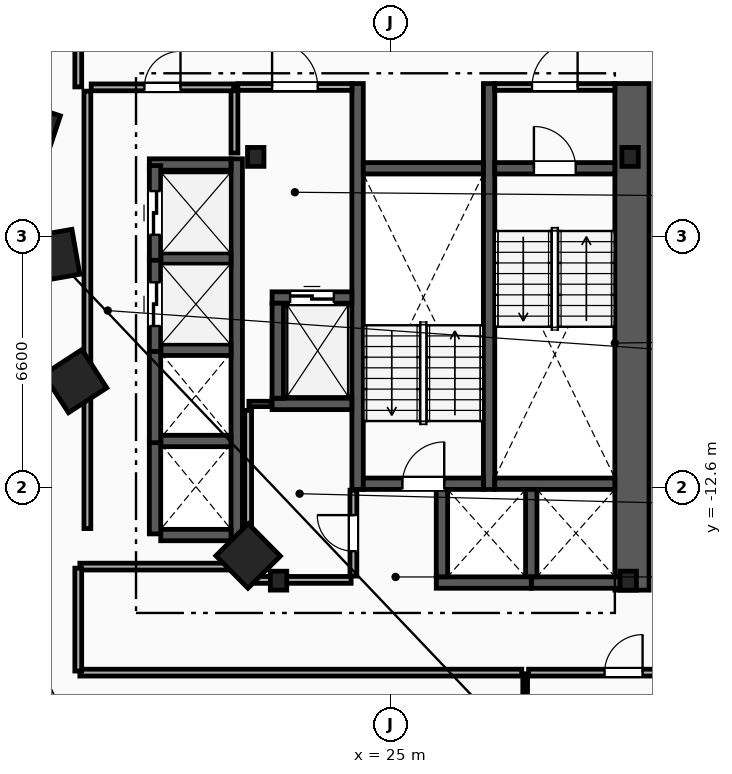
"""IFC4 building model, lengths in metres.
Left out: names, types, materials, properties, quantities, classifications, styles, units other than length and angle.
Written with IfcOpenShell. Run it as: python <this file> out.ifc"""

import sys

from ifc_helpers import new_model, si_unit, direction, frame, frame_2d, origin, origin_2d, place, context, subcontext, project, spatial, rectangle, i_section, extrude, element, fill, save


model = new_model("IFC4")
c1 = context("Model", 3, precision=1e-05, world=origin(), true_north=direction((0.0, 1.0)))
c2 = subcontext(c1, "Body", "Model", "MODEL_VIEW")
j1 = project(units=[si_unit("LENGTHUNIT", "METRE"), si_unit("PLANEANGLEUNIT", "RADIAN")], contexts=[c1])
p1 = place(None, origin())
s1 = spatial("IfcSite", under=j1, at=p1, CompositionType="ELEMENT")
p2 = place(p1, origin())
s2 = spatial("IfcBuilding", under=s1, at=p2, CompositionType="ELEMENT")
p3 = place(p2, frame((0.0, 0.0, 27.8)))
s3 = spatial("IfcBuildingStorey", under=s2, at=p3, CompositionType="ELEMENT", Elevation=27.8)
for number, where, z_axis, x_axis in (
    (1, (31.3, -3.9, 0.0), (0.0, 0.0, 1.0), (1.0, 0.0, 0.0)),
    (2, (21.45, -3.9, 0.0), (0.0, 0.0, 1.0), (1.0, 0.0, 0.0)),
    (3, (22.05, -15.05, 0.0), (0.0, 0.0, 1.0), (1.0, 0.0, 0.0)),
    (4, (31.25, -15.05, 0.0), (0.0, 0.0, 1.0), (1.0, 0.0, 0.0)),
):
    element("IfcColumn", number, at=place(p3, frame(where, z_axis=z_axis, x_axis=x_axis)), inside=s3, PredefinedType="COLUMN", context=c2, shape_type="SweptSolid", body=[
        extrude(i_section(OverallWidth=0.432, OverallDepth=0.498, WebThickness=0.056, FlangeThickness=0.089, FilletRadius=0.018, at=origin_2d()), origin(), (0.0, 0.0, 1.0), 3.8),
    ])
for number, where, z_axis, x_axis in (
    (5, (15.55, -3.2, 0.0), (0.0, 0.0, 1.0), (-0.315, -0.949, 0.0)),
    (6, (16.125, -6.5, 0.0), (0.0, 0.0, 1.0), (0.172, -0.985, 0.0)),
    (7, (16.7, -9.8, 0.0), (0.0, 0.0, 1.0), (0.544, -0.839, 0.0)),
    (8, (21.25, -14.4, 0.0), (0.0, 0.0, 1.0), (0.703, -0.711, 0.0)),
):
    element("IfcColumn", number, at=place(p3, frame(where, z_axis=z_axis, x_axis=x_axis)), inside=s3, PredefinedType="COLUMN", context=c2, shape_type="SweptSolid", body=[
        extrude(rectangle(XDim=1.2, YDim=1.2, at=origin_2d()), origin(), (0.0, 0.0, 1.0), 3.8),
    ])
p4 = place(p3, frame((31.35, -15.3, 0.0), z_axis=(0.0, 0.0, 1.0), x_axis=(0.0, 1.0, 0.0)))
e9 = element("IfcWall", 9, at=p4, inside=s3, PredefinedType="SHEAR", context=c2, shape_type="SweptSolid", body=[
    extrude(rectangle(XDim=13.33, YDim=0.9, at=frame_2d((6.665, 0.0))), origin(), (0.0, 0.0, 1.0), 3.5),
])
for number, where, z_axis, x_axis in (
    (10, (27.59, -12.65, 0.0), (0.0, 0.0, 1.0), (0.0, 1.0, 0.0)),
    (11, (24.13, -12.65, 0.0), (0.0, 0.0, 1.0), (0.0, 1.0, 0.0)),
):
    element("IfcWall", number, at=place(p3, frame(where, z_axis=z_axis, x_axis=x_axis)), inside=s3, PredefinedType="SHEAR", context=c2, shape_type="SweptSolid", body=[
        extrude(rectangle(XDim=10.68, YDim=0.3, at=frame_2d((5.34, 0.0))), origin(), (0.0, 0.0, 1.0), 3.5),
    ])
p5 = place(p3, frame((27.74, -4.2, 0.0), z_axis=(0.0, 0.0, 1.0), x_axis=(1.0, 0.0, 0.0)))
e12 = element("IfcWall", 12, at=p5, inside=s3, PredefinedType="SHEAR", context=c2, shape_type="SweptSolid", body=[
    extrude(rectangle(XDim=3.16, YDim=0.3, at=frame_2d((1.58, 0.0))), origin(), (0.0, 0.0, 1.0), 3.5),
])
p6 = place(p5, frame((1.03, 0.0, 0.0)))
e13 = element("IfcOpeningElement", 13, at=p6, cuts=e12, PredefinedType="OPENING", context=c2, shape_type="SweptSolid", body=[
    extrude(rectangle(XDim=1.1, YDim=2.15, at=frame_2d((0.55, 1.075))), frame((0.0, 0.16, 0.0), z_axis=(0.0, -1.0, 0.0), x_axis=(1.0, 0.0, 0.0)), (0.0, 0.0, 1.0), 0.32),
])
p7 = place(p3, frame((27.74, -12.5, 0.0), z_axis=(0.0, 0.0, 1.0), x_axis=(1.0, 0.0, 0.0)))
e14 = element("IfcWall", 14, at=p7, inside=s3, PredefinedType="SHEAR", context=c2, shape_type="SweptSolid", body=[
    extrude(rectangle(XDim=3.16, YDim=0.3, at=frame_2d((1.58, 0.0))), origin(), (0.0, 0.0, 1.0), 3.5),
])
p8 = place(p3, frame((24.28, -12.5, 0.0), z_axis=(0.0, 0.0, 1.0), x_axis=(1.0, 0.0, 0.0)))
e15 = element("IfcWall", 15, at=p8, inside=s3, PredefinedType="SHEAR", context=c2, shape_type="SweptSolid", body=[
    extrude(rectangle(XDim=3.16, YDim=0.3, at=frame_2d((1.58, 0.0))), origin(), (0.0, 0.0, 1.0), 3.5),
])
p9 = place(p8, frame((1.03, 0.0, 0.0)))
e16 = element("IfcOpeningElement", 16, at=p9, cuts=e15, PredefinedType="OPENING", context=c2, shape_type="SweptSolid", body=[
    extrude(rectangle(XDim=1.1, YDim=2.15, at=frame_2d((0.55, 1.075))), frame((0.0, 0.16, 0.0), z_axis=(0.0, -1.0, 0.0), x_axis=(1.0, 0.0, 0.0)), (0.0, 0.0, 1.0), 0.32),
])
p10 = place(p3, frame((24.28, -4.2, 0.0), z_axis=(0.0, 0.0, 1.0), x_axis=(1.0, 0.0, 0.0)))
e17 = element("IfcWall", 17, at=p10, inside=s3, PredefinedType="SHEAR", context=c2, shape_type="SweptSolid", body=[
    extrude(rectangle(XDim=3.16, YDim=0.3, at=frame_2d((1.58, 0.0))), origin(), (0.0, 0.0, 1.0), 3.5),
])
p11 = place(p3, frame((20.89, -3.8, 0.0), z_axis=(0.0, 0.0, 1.0), x_axis=(0.0, 1.0, 0.0)))
e18 = element("IfcWall", 18, at=p11, inside=s3, PredefinedType="PARTITIONING", context=c2, shape_type="SweptSolid", body=[
    extrude(rectangle(XDim=1.65, YDim=0.18, at=frame_2d((0.825, 0.0))), origin(), (0.0, 0.0, 1.0), 3.5),
])
p12 = place(p3, frame((20.98, -2.06, 0.0), z_axis=(0.0, 0.0, 1.0), x_axis=(1.0, 0.0, 0.0)))
e19 = element("IfcWall", 19, at=p12, inside=s3, PredefinedType="PARTITIONING", context=c2, shape_type="SweptSolid", body=[
    extrude(rectangle(XDim=3.0, YDim=0.18, at=frame_2d((1.5, 0.0))), origin(), (0.0, 0.0, 1.0), 3.5),
])
p13 = place(p12, frame((0.9, 0.0, 0.0)))
e20 = element("IfcOpeningElement", 20, at=p13, cuts=e19, PredefinedType="OPENING", context=c2, shape_type="SweptSolid", body=[
    extrude(rectangle(XDim=1.2, YDim=2.15, at=frame_2d((0.6, 1.075))), frame((0.0, 0.1, 0.0), z_axis=(0.0, -1.0, 0.0), x_axis=(1.0, 0.0, 0.0)), (0.0, 0.0, 1.0), 0.2),
])
p14 = place(p3, frame((27.74, -2.06, 0.0), z_axis=(0.0, 0.0, 1.0), x_axis=(1.0, 0.0, 0.0)))
e21 = element("IfcWall", 21, at=p14, inside=s3, PredefinedType="PARTITIONING", context=c2, shape_type="SweptSolid", body=[
    extrude(rectangle(XDim=3.16, YDim=0.18, at=frame_2d((1.58, 0.0))), origin(), (0.0, 0.0, 1.0), 3.5),
])
p15 = place(p14, frame((0.98, 0.0, 0.0)))
e22 = element("IfcOpeningElement", 22, at=p15, cuts=e21, PredefinedType="OPENING", context=c2, shape_type="SweptSolid", body=[
    extrude(rectangle(XDim=1.2, YDim=2.15, at=frame_2d((0.6, 1.075))), frame((0.0, 0.1, 0.0), z_axis=(0.0, -1.0, 0.0), x_axis=(1.0, 0.0, 0.0)), (0.0, 0.0, 1.0), 0.2),
])
p16 = place(p3, frame((21.88, -7.6, 0.0), z_axis=(0.0, 0.0, 1.0), x_axis=(1.0, 0.0, 0.0)))
e23 = element("IfcWall", 23, at=p16, inside=s3, PredefinedType="SHEAR", context=c2, shape_type="SweptSolid", body=[
    extrude(rectangle(XDim=2.1, YDim=0.3, at=frame_2d((1.05, 0.0))), origin(), (0.0, 0.0, 1.0), 3.5),
])
p17 = place(p16, frame((0.475, 0.0, 0.0)))
e24 = element("IfcOpeningElement", 24, at=p17, cuts=e23, PredefinedType="OPENING", context=c2, shape_type="SweptSolid", body=[
    extrude(rectangle(XDim=1.15, YDim=2.2, at=frame_2d((0.575, 1.1))), frame((0.0, 0.16, 0.0), z_axis=(0.0, -1.0, 0.0), x_axis=(1.0, 0.0, 0.0)), (0.0, 0.0, 1.0), 0.32),
])
p18 = place(p3, frame((21.88, -10.4, 0.0), z_axis=(0.0, 0.0, 1.0), x_axis=(1.0, 0.0, 0.0)))
e25 = element("IfcWall", 25, at=p18, inside=s3, PredefinedType="SHEAR", context=c2, shape_type="SweptSolid", body=[
    extrude(rectangle(XDim=2.1, YDim=0.3, at=frame_2d((1.05, 0.0))), origin(), (0.0, 0.0, 1.0), 3.5),
])
for number, where, z_axis, x_axis in (
    (26, (22.03, -10.25, 0.0), (0.0, 0.0, 1.0), (0.0, 1.0, 0.0)),
    (27, (28.7, -15.1, 0.0), (0.0, 0.0, 1.0), (1.0, 0.0, 0.0)),
):
    element("IfcWall", number, at=place(p3, frame(where, z_axis=z_axis, x_axis=x_axis)), inside=s3, PredefinedType="SHEAR", context=c2, shape_type="SweptSolid", body=[
        extrude(rectangle(XDim=2.5, YDim=0.3, at=frame_2d((1.25, 0.0))), origin(), (0.0, 0.0, 1.0), 3.5),
    ])
p19 = place(p3, frame((28.7, -14.95, 0.0), z_axis=(0.0, 0.0, 1.0), x_axis=(0.0, 1.0, 0.0)))
e28 = element("IfcWall", 28, at=p19, inside=s3, PredefinedType="SHEAR", context=c2, shape_type="SweptSolid", body=[
    extrude(rectangle(XDim=2.3, YDim=0.3, at=frame_2d((1.15, 0.0))), origin(), (0.0, 0.0, 1.0), 3.5),
])
p20 = place(p3, frame((26.2, -15.1, 0.0), z_axis=(0.0, 0.0, 1.0), x_axis=(1.0, 0.0, 0.0)))
e29 = element("IfcWall", 29, at=p20, inside=s3, PredefinedType="SHEAR", context=c2, shape_type="SweptSolid", body=[
    extrude(rectangle(XDim=2.5, YDim=0.3, at=frame_2d((1.25, 0.0))), origin(), (0.0, 0.0, 1.0), 3.5),
])
p21 = place(p3, frame((26.35, -14.95, 0.0), z_axis=(0.0, 0.0, 1.0), x_axis=(0.0, 1.0, 0.0)))
e30 = element("IfcWall", 30, at=p21, inside=s3, PredefinedType="SHEAR", context=c2, shape_type="SweptSolid", body=[
    extrude(rectangle(XDim=2.3, YDim=0.3, at=frame_2d((1.15, 0.0))), origin(), (0.0, 0.0, 1.0), 3.5),
])
p22 = place(p3, frame((20.95, -14.0, 0.0), z_axis=(0.0, 0.0, 1.0), x_axis=(0.0, 1.0, 0.0)))
e31 = element("IfcWall", 31, at=p22, inside=s3, PredefinedType="SHEAR", context=c2, shape_type="SweptSolid", body=[
    extrude(rectangle(XDim=10.05, YDim=0.3, at=frame_2d((5.025, 0.0))), origin(), (0.0, 0.0, 1.0), 3.5),
])
p23 = place(p3, frame((18.95, -13.85, 0.0), z_axis=(0.0, 0.0, 1.0), x_axis=(1.0, 0.0, 0.0)))
e32 = element("IfcWall", 32, at=p23, inside=s3, PredefinedType="SHEAR", context=c2, shape_type="SweptSolid", body=[
    extrude(rectangle(XDim=1.85, YDim=0.3, at=frame_2d((0.925, 0.0))), origin(), (0.0, 0.0, 1.0), 3.5),
])
p24 = place(p3, frame((18.65, -4.1, 0.0), z_axis=(0.0, 0.0, 1.0), x_axis=(1.0, 0.0, 0.0)))
e33 = element("IfcWall", 33, at=p24, inside=s3, PredefinedType="SHEAR", context=c2, shape_type="SweptSolid", body=[
    extrude(rectangle(XDim=2.15, YDim=0.3, at=frame_2d((1.075, 0.0))), origin(), (0.0, 0.0, 1.0), 3.5),
])
for number, where, z_axis, x_axis in (
    (34, (18.95, -11.375, 0.0), (0.0, 0.0, 1.0), (1.0, 0.0, 0.0)),
    (35, (18.95, -8.975, 0.0), (0.0, 0.0, 1.0), (1.0, 0.0, 0.0)),
    (36, (18.95, -6.575, 0.0), (0.0, 0.0, 1.0), (1.0, 0.0, 0.0)),
):
    element("IfcWall", number, at=place(p3, frame(where, z_axis=z_axis, x_axis=x_axis)), inside=s3, PredefinedType="SHEAR", context=c2, shape_type="SweptSolid", body=[
        extrude(rectangle(XDim=1.85, YDim=0.3, at=frame_2d((0.925, 0.0))), origin(), (0.0, 0.0, 1.0), 3.5),
    ])
for number, where, z_axis, x_axis in (
    (37, (18.8, -13.82, 0.0), (0.0, 0.0, 1.0), (0.0, 1.0, 0.0)),
    (38, (18.8, -11.42, 0.0), (0.0, 0.0, 1.0), (0.0, 1.0, 0.0)),
):
    element("IfcWall", number, at=place(p3, frame(where, z_axis=z_axis, x_axis=x_axis)), inside=s3, PredefinedType="SHEAR", context=c2, shape_type="SweptSolid", body=[
        extrude(rectangle(XDim=2.49, YDim=0.3, at=frame_2d((1.245, 0.0))), origin(), (0.0, 0.0, 1.0), 3.5),
    ])
p25 = place(p3, frame((18.8, -9.02, 0.0), z_axis=(0.0, 0.0, 1.0), x_axis=(0.0, 1.0, 0.0)))
e39 = element("IfcWall", 39, at=p25, inside=s3, PredefinedType="SHEAR", context=c2, shape_type="SweptSolid", body=[
    extrude(rectangle(XDim=2.49, YDim=0.3, at=frame_2d((1.245, 0.0))), origin(), (0.0, 0.0, 1.0), 3.5),
])
p26 = place(p25, frame((0.67, 0.0, 0.0)))
e40 = element("IfcOpeningElement", 40, at=p26, cuts=e39, PredefinedType="OPENING", context=c2, shape_type="SweptSolid", body=[
    extrude(rectangle(XDim=1.15, YDim=2.2, at=frame_2d((0.575, 1.1))), frame((0.0, 0.16, 0.0), z_axis=(0.0, -1.0, 0.0), x_axis=(1.0, 0.0, 0.0)), (0.0, 0.0, 1.0), 0.32),
])
p27 = place(p3, frame((18.8, -6.62, 0.0), z_axis=(0.0, 0.0, 1.0), x_axis=(0.0, 1.0, 0.0)))
e41 = element("IfcWall", 41, at=p27, inside=s3, PredefinedType="SHEAR", context=c2, shape_type="SweptSolid", body=[
    extrude(rectangle(XDim=2.49, YDim=0.3, at=frame_2d((1.245, 0.0))), origin(), (0.0, 0.0, 1.0), 3.5),
])
p28 = place(p27, frame((0.67, 0.0, 0.0)))
e42 = element("IfcOpeningElement", 42, at=p28, cuts=e41, PredefinedType="OPENING", context=c2, shape_type="SweptSolid", body=[
    extrude(rectangle(XDim=1.15, YDim=2.2, at=frame_2d((0.575, 1.1))), frame((0.0, 0.16, 0.0), z_axis=(0.0, -1.0, 0.0), x_axis=(1.0, 0.0, 0.0)), (0.0, 0.0, 1.0), 0.32),
])
p29 = place(p3, frame((17.02, -13.68, 0.0), z_axis=(0.0, 0.0, 1.0), x_axis=(0.0, 1.0, 0.0)))
e43 = element("IfcWall", 43, at=p29, inside=s3, PredefinedType="PARTITIONING", context=c2, shape_type="SweptSolid", body=[
    extrude(rectangle(XDim=11.51, YDim=0.18, at=frame_2d((5.755, 0.0))), origin(), (0.0, 0.0, 1.0), 3.5),
])
p30 = place(p3, frame((17.12, -2.07, 0.0), z_axis=(0.0, 0.0, 1.0), x_axis=(1.0, 0.0, 0.0)))
e44 = element("IfcWall", 44, at=p30, inside=s3, PredefinedType="PARTITIONING", context=c2, shape_type="SweptSolid", body=[
    extrude(rectangle(XDim=3.75, YDim=0.18, at=frame_2d((1.875, 0.0))), origin(), (0.0, 0.0, 1.0), 3.5),
])
p31 = place(p30, frame((1.4, 0.0, 0.0)))
e45 = element("IfcOpeningElement", 45, at=p31, cuts=e44, PredefinedType="OPENING", context=c2, shape_type="SweptSolid", body=[
    extrude(rectangle(XDim=0.95, YDim=2.1, at=frame_2d((0.475, 1.05))), frame((0.0, 0.1, 0.0), z_axis=(0.0, -1.0, 0.0), x_axis=(1.0, 0.0, 0.0)), (0.0, 0.0, 1.0), 0.2),
])
p32 = place(p3, frame((21.27, -10.4, 0.0), z_axis=(0.0, 0.0, 1.0), x_axis=(1.0, 0.0, 0.0)))
e46 = element("IfcWall", 46, at=p32, inside=s3, PredefinedType="PARTITIONING", context=c2, shape_type="SweptSolid", body=[
    extrude(rectangle(XDim=0.59, YDim=0.14, at=frame_2d((0.295, 0.0))), origin(), (0.0, 0.0, 1.0), 3.5),
])
p33 = place(p3, frame((21.25, -14.93, 0.0), z_axis=(0.0, 0.0, 1.0), x_axis=(0.0, 1.0, 0.0)))
e47 = element("IfcWall", 47, at=p33, inside=s3, PredefinedType="PARTITIONING", context=c2, shape_type="SweptSolid", body=[
    extrude(rectangle(XDim=4.36, YDim=0.18, at=frame_2d((2.18, 0.0))), origin(), (0.0, 0.0, 1.0), 3.5),
])
p34 = place(p3, frame((21.35, -15.03, 0.0), z_axis=(0.0, 0.0, 1.0), x_axis=(1.0, 0.0, 0.0)))
e48 = element("IfcWall", 48, at=p34, inside=s3, PredefinedType="PARTITIONING", context=c2, shape_type="SweptSolid", body=[
    extrude(rectangle(XDim=2.61, YDim=0.18, at=frame_2d((1.305, 0.0))), origin(), (0.0, 0.0, 1.0), 2.573),
])
p35 = place(p3, frame((24.02, -14.93, 0.0), z_axis=(0.0, 0.0, 1.0), x_axis=(0.0, 1.0, 0.0)))
e49 = element("IfcWall", 49, at=p35, inside=s3, PredefinedType="PARTITIONING", context=c2, shape_type="SweptSolid", body=[
    extrude(rectangle(XDim=2.26, YDim=0.18, at=frame_2d((1.13, 0.0))), origin(), (0.0, 0.0, 1.0), 3.5),
])
p36 = place(p35, frame((0.655, 0.0, 0.0)))
e50 = element("IfcOpeningElement", 50, at=p36, cuts=e49, PredefinedType="OPENING", context=c2, shape_type="SweptSolid", body=[
    extrude(rectangle(XDim=0.95, YDim=2.1, at=frame_2d((0.475, 1.05))), frame((0.0, 0.1, 0.0), z_axis=(0.0, -1.0, 0.0), x_axis=(1.0, 0.0, 0.0)), (0.0, 0.0, 1.0), 0.2),
])
p37 = place(p3, frame((28.54, -25.794, 0.0), z_axis=(0.0, 0.0, 1.0), x_axis=(0.0, 1.0, 0.0)))
e51 = element("IfcWall", 51, at=p37, inside=s3, PredefinedType="PARTITIONING", context=c2, shape_type="SweptSolid", body=[
    extrude(rectangle(XDim=8.294, YDim=0.125, at=frame_2d((4.147, 0.0))), origin(), (0.0, 0.0, 1.0), 3.5),
])
p38 = place(p3, frame((28.63, -17.47, 0.0), z_axis=(0.0, 0.0, 1.0), x_axis=(1.0, 0.0, 0.0)))
e52 = element("IfcWall", 52, at=p38, inside=s3, PredefinedType="PARTITIONING", context=c2, shape_type="SweptSolid", body=[
    extrude(rectangle(XDim=4.999, YDim=0.18, at=frame_2d((2.499, 0.0))), origin(), (0.0, 0.0, 1.0), 3.5),
])
p39 = place(p38, frame((1.999, 0.0, 0.0)))
e53 = element("IfcOpeningElement", 53, at=p39, cuts=e52, PredefinedType="OPENING", context=c2, shape_type="SweptSolid", body=[
    extrude(rectangle(XDim=1.0, YDim=2.15, at=frame_2d((0.5, 1.075))), frame((0.0, 0.1, 0.0), z_axis=(0.0, -1.0, 0.0), x_axis=(1.0, 0.0, 0.0)), (0.0, 0.0, 1.0), 0.2),
])
p40 = place(p3, frame((16.822, -17.47, 0.0), z_axis=(0.0, 0.0, 1.0), x_axis=(1.0, 0.0, 0.0)))
e54 = element("IfcWall", 54, at=p40, inside=s3, PredefinedType="PARTITIONING", context=c2, shape_type="SweptSolid", body=[
    extrude(rectangle(XDim=11.628, YDim=0.18, at=frame_2d((5.814, 0.0))), origin(), (0.0, 0.0, 1.0), 3.5),
])
p41 = place(p3, frame((21.178, -14.68, 0.0), z_axis=(0.0, 0.0, 1.0), x_axis=(-1.0, 0.0, 0.0)))
e55 = element("IfcWall", 55, at=p41, inside=s3, PredefinedType="PARTITIONING", context=c2, shape_type="SweptSolid", body=[
    extrude(rectangle(XDim=4.357, YDim=0.18, at=frame_2d((2.178, 0.0))), origin(), (0.0, 0.0, 1.0), 3.5),
])
p42 = place(p3, frame((16.78, -14.721, 0.0), z_axis=(0.0, 0.0, 1.0), x_axis=(0.0, -1.0, 0.0)))
e56 = element("IfcWall", 56, at=p42, inside=s3, PredefinedType="PARTITIONING", context=c2, shape_type="SweptSolid", body=[
    extrude(rectangle(XDim=2.707, YDim=0.18, at=frame_2d((1.354, 0.0))), origin(), (0.0, 0.0, 1.0), 3.5),
])
p43 = place(p3, frame((16.78, 0.329, 0.0), z_axis=(0.0, 0.0, 1.0), x_axis=(0.0, -1.0, 0.0)))
e57 = element("IfcWall", 57, at=p43, inside=s3, PredefinedType="PARTITIONING", context=c2, shape_type="SweptSolid", body=[
    extrude(rectangle(XDim=2.387, YDim=0.18, at=frame_2d((1.194, 0.0))), origin(), (0.0, 0.0, 1.0), 3.5),
])
p44 = place(p6, origin())
e58 = element("IfcDoor", 58, at=p44, inside=s3, OperationType="SINGLE_SWING_LEFT", PredefinedType="DOOR", context=c2, shape_type="SweptSolid", body=[
    extrude(rectangle(XDim=1.1, YDim=2.15, at=frame_2d((0.55, 1.075))), frame((0.0, 0.025, 0.0), z_axis=(0.0, -1.0, 0.0), x_axis=(1.0, 0.0, 0.0)), (0.0, 0.0, 1.0), 0.05),
])
fill(e13, e58)
p45 = place(p9, origin())
e59 = element("IfcDoor", 59, at=p45, inside=s3, OperationType="SINGLE_SWING_RIGHT", PredefinedType="DOOR", context=c2, shape_type="SweptSolid", body=[
    extrude(rectangle(XDim=1.1, YDim=2.15, at=frame_2d((0.55, 1.075))), frame((0.0, 0.025, 0.0), z_axis=(0.0, -1.0, 0.0), x_axis=(1.0, 0.0, 0.0)), (0.0, 0.0, 1.0), 0.05),
])
fill(e16, e59)
p46 = place(p13, origin())
e60 = element("IfcDoor", 60, at=p46, inside=s3, OperationType="SINGLE_SWING_LEFT", PredefinedType="DOOR", context=c2, shape_type="SweptSolid", body=[
    extrude(rectangle(XDim=1.2, YDim=2.15, at=frame_2d((0.6, 1.075))), frame((0.0, 0.025, 0.0), z_axis=(0.0, -1.0, 0.0), x_axis=(1.0, 0.0, 0.0)), (0.0, 0.0, 1.0), 0.05),
])
fill(e20, e60)
p47 = place(p15, origin())
e61 = element("IfcDoor", 61, at=p47, inside=s3, OperationType="SINGLE_SWING_RIGHT", PredefinedType="DOOR", context=c2, shape_type="SweptSolid", body=[
    extrude(rectangle(XDim=1.2, YDim=2.15, at=frame_2d((0.6, 1.075))), frame((0.0, 0.025, 0.0), z_axis=(0.0, -1.0, 0.0), x_axis=(1.0, 0.0, 0.0)), (0.0, 0.0, 1.0), 0.05),
])
fill(e22, e61)
p48 = place(p17, origin())
e62 = element("IfcDoor", 62, at=p48, inside=s3, OperationType="SLIDING_TO_LEFT", PredefinedType="TRAPDOOR", context=c2, shape_type="SweptSolid", body=[
    extrude(rectangle(XDim=1.15, YDim=2.2, at=frame_2d((0.575, 1.1))), frame((0.0, 0.025, 0.0), z_axis=(0.0, -1.0, 0.0), x_axis=(1.0, 0.0, 0.0)), (0.0, 0.0, 1.0), 0.05),
])
fill(e24, e62)
p49 = place(p26, origin())
e63 = element("IfcDoor", 63, at=p49, inside=s3, OperationType="SLIDING_TO_LEFT", PredefinedType="TRAPDOOR", context=c2, shape_type="SweptSolid", body=[
    extrude(rectangle(XDim=1.15, YDim=2.2, at=frame_2d((0.575, 1.1))), frame((0.0, 0.025, 0.0), z_axis=(0.0, -1.0, 0.0), x_axis=(1.0, 0.0, 0.0)), (0.0, 0.0, 1.0), 0.05),
])
fill(e40, e63)
p50 = place(p28, origin())
e64 = element("IfcDoor", 64, at=p50, inside=s3, OperationType="SLIDING_TO_LEFT", PredefinedType="TRAPDOOR", context=c2, shape_type="SweptSolid", body=[
    extrude(rectangle(XDim=1.15, YDim=2.2, at=frame_2d((0.575, 1.1))), frame((0.0, 0.025, 0.0), z_axis=(0.0, -1.0, 0.0), x_axis=(1.0, 0.0, 0.0)), (0.0, 0.0, 1.0), 0.05),
])
fill(e42, e64)
p51 = place(p39, origin())
e65 = element("IfcDoor", 65, at=p51, inside=s3, OperationType="SINGLE_SWING_RIGHT", PredefinedType="DOOR", context=c2, shape_type="SweptSolid", body=[
    extrude(rectangle(XDim=1.0, YDim=2.15, at=frame_2d((0.5, 1.075))), frame((0.0, 0.025, 0.0), z_axis=(0.0, -1.0, 0.0), x_axis=(1.0, 0.0, 0.0)), (0.0, 0.0, 1.0), 0.05),
])
fill(e53, e65)
p52 = place(p31, origin())
e66 = element("IfcDoor", 66, at=p52, inside=s3, OperationType="SINGLE_SWING_RIGHT", PredefinedType="DOOR", context=c2, shape_type="SweptSolid", body=[
    extrude(rectangle(XDim=0.95, YDim=2.1, at=frame_2d((0.475, 1.05))), frame((0.0, 0.025, 0.0), z_axis=(0.0, -1.0, 0.0), x_axis=(1.0, 0.0, 0.0)), (0.0, 0.0, 1.0), 0.05),
])
fill(e45, e66)
p53 = place(p36, origin())
e67 = element("IfcDoor", 67, at=p53, inside=s3, OperationType="SINGLE_SWING_RIGHT", PredefinedType="DOOR", context=c2, shape_type="SweptSolid", body=[
    extrude(rectangle(XDim=0.95, YDim=2.1, at=frame_2d((0.475, 1.05))), frame((0.0, 0.025, 0.0), z_axis=(0.0, -1.0, 0.0), x_axis=(1.0, 0.0, 0.0)), (0.0, 0.0, 1.0), 0.05),
])
fill(e50, e67)
save(model, sys.argv[1])
